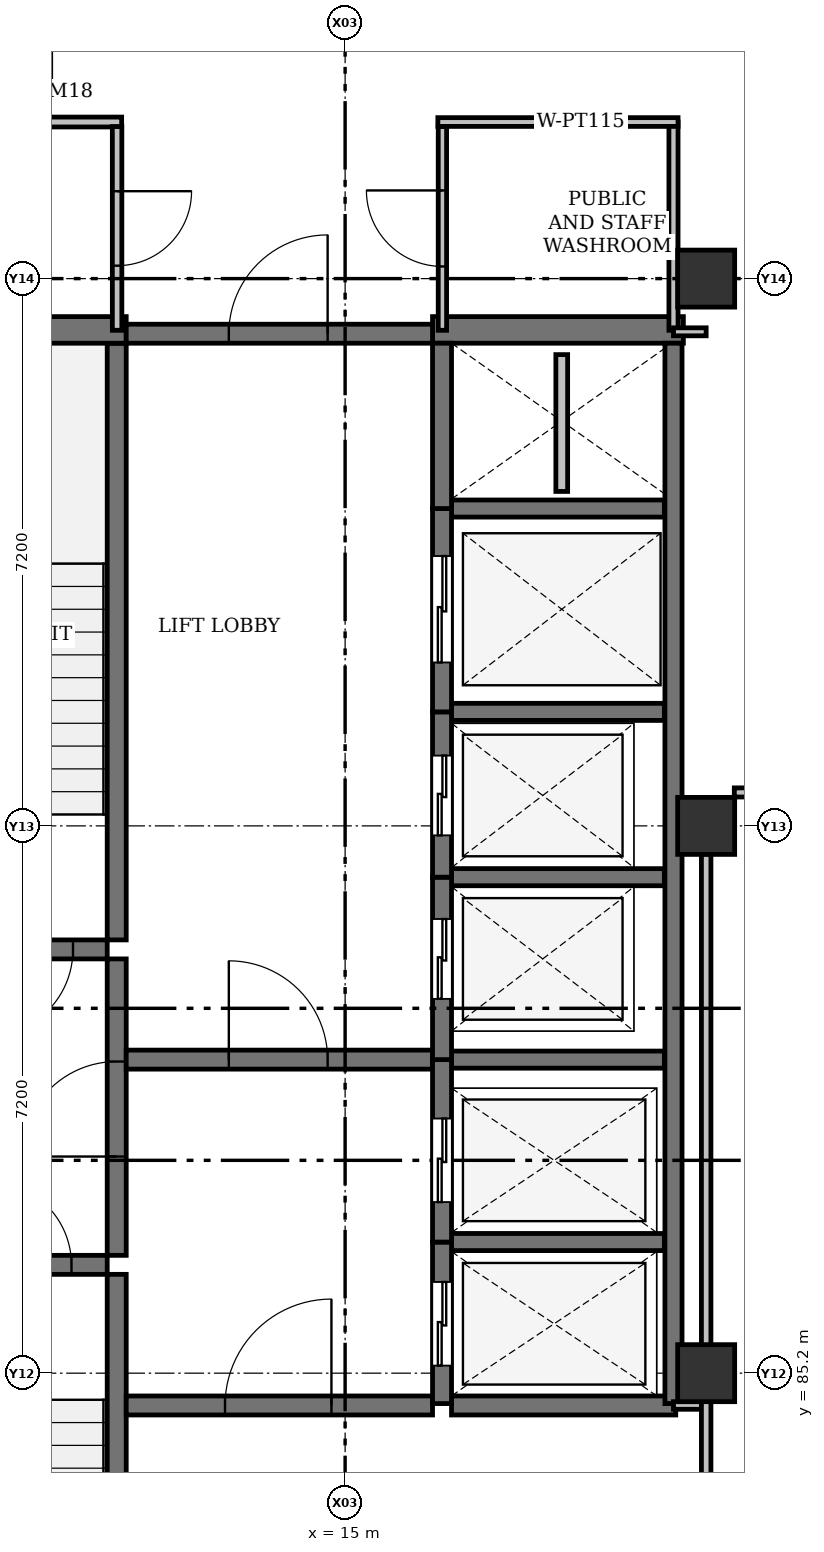
"""IFC4 building model, lengths in metres.
Left out: names, types, materials, properties, quantities, classifications, styles, units other than length and angle.
Written with IfcOpenShell. Run it as: python <this file> out.ifc"""

import sys

from ifc_helpers import new_model, si_unit, direction, frame, frame_2d, origin, origin_2d, place, context, subcontext, project, spatial, rectangle, extrude, element, fill, save


model = new_model("IFC4")
c1 = context("Model", 3, precision=1e-05, world=origin(), true_north=direction((0.0, 1.0)))
c2 = subcontext(c1, "Body", "Model", "MODEL_VIEW")
j1 = project(units=[si_unit("LENGTHUNIT", "METRE"), si_unit("PLANEANGLEUNIT", "RADIAN")], contexts=[c1])
p1 = place(None, origin())
s1 = spatial("IfcSite", under=j1, at=p1, CompositionType="ELEMENT")
p2 = place(p1, origin())
s2 = spatial("IfcBuilding", under=s1, at=p2, CompositionType="ELEMENT")
p3 = place(p2, frame((0.0, 0.0, -4.2)))
s3 = spatial("IfcBuildingStorey", under=s2, at=p3, CompositionType="ELEMENT", Elevation=-4.2)
for number, where, z_axis, x_axis in (
    (1, (19.75, 85.2, 0.0), (0.0, 0.0, 1.0), (1.0, 0.0, 0.0)),
    (2, (19.75, 92.4, 0.0), (0.0, 0.0, 1.0), (1.0, 0.0, 0.0)),
    (3, (19.75, 99.6, 0.0), (0.0, 0.0, 1.0), (1.0, 0.0, 0.0)),
):
    element("IfcColumn", number, at=place(p3, frame(where, z_axis=z_axis, x_axis=x_axis)), inside=s3, PredefinedType="COLUMN", context=c2, shape_type="SweptSolid", body=[
        extrude(rectangle(XDim=0.75, YDim=0.75, at=origin_2d()), origin(), (0.0, 0.0, 1.0), 4.2),
    ])
for number, where, z_axis, x_axis in (
    (4, (11.995, 78.65, 0.0), (0.0, 0.0, 1.0), (0.0, 1.0, 0.0)),
    (5, (11.995, 90.9, 0.0), (0.0, 0.0, 1.0), (0.0, 1.0, 0.0)),
):
    element("IfcWall", number, at=place(p3, frame(where, z_axis=z_axis, x_axis=x_axis)), inside=s3, PredefinedType="SHEAR", context=c2, shape_type="SweptSolid", body=[
        extrude(rectangle(XDim=7.85, YDim=0.25, at=frame_2d((3.925, 0.0))), origin(), (0.0, 0.0, 1.0), 4.2),
    ])
p4 = place(p3, frame((11.995, 86.75, 0.0), z_axis=(0.0, 0.0, 1.0), x_axis=(0.0, 1.0, 0.0)))
e6 = element("IfcWall", 6, at=p4, inside=s3, PredefinedType="SHEAR", context=c2, shape_type="SweptSolid", body=[
    extrude(rectangle(XDim=3.9, YDim=0.25, at=frame_2d((1.95, 0.0))), origin(), (0.0, 0.0, 1.0), 4.2),
])
p5 = place(p4, frame((1.3, 0.0, 0.0)))
e7 = element("IfcOpeningElement", 7, at=p5, cuts=e6, PredefinedType="OPENING", context=c2, shape_type="SweptSolid", body=[
    extrude(rectangle(XDim=1.25, YDim=2.2, at=frame_2d((0.625, 1.1))), frame((0.0, 0.125, 0.0), z_axis=(0.0, -1.0, 0.0), x_axis=(1.0, 0.0, 0.0)), (0.0, 0.0, 1.0), 0.25),
])
p6 = place(p3, frame((8.35, 98.925, 0.0), z_axis=(0.0, 0.0, 1.0), x_axis=(1.0, 0.0, 0.0)))
e8 = element("IfcWall", 8, at=p6, inside=s3, PredefinedType="SHEAR", context=c2, shape_type="SweptSolid", body=[
    extrude(rectangle(XDim=3.77, YDim=0.35, at=frame_2d((1.885, 0.0))), origin(), (0.0, 0.0, 1.0), 4.2),
])
p7 = place(p3, frame((16.15, 98.925, 0.0), z_axis=(0.0, 0.0, 1.0), x_axis=(1.0, 0.0, 0.0)))
e9 = element("IfcWall", 9, at=p7, inside=s3, PredefinedType="SHEAR", context=c2, shape_type="SweptSolid", body=[
    extrude(rectangle(XDim=3.3, YDim=0.35, at=frame_2d((1.65, 0.0))), origin(), (0.0, 0.0, 1.0), 4.2),
])
p8 = place(p3, frame((12.12, 98.875, 0.0), z_axis=(0.0, 0.0, 1.0), x_axis=(1.0, 0.0, 0.0)))
e10 = element("IfcWall", 10, at=p8, inside=s3, PredefinedType="SHEAR", context=c2, shape_type="SweptSolid", body=[
    extrude(rectangle(XDim=4.03, YDim=0.25, at=frame_2d((2.015, 0.0))), origin(), (0.0, 0.0, 1.0), 4.2),
])
p9 = place(p8, frame((1.35, 0.0, 0.0)))
e11 = element("IfcOpeningElement", 11, at=p9, cuts=e10, PredefinedType="OPENING", context=c2, shape_type="SweptSolid", body=[
    extrude(rectangle(XDim=1.3, YDim=2.2, at=frame_2d((0.65, 1.1))), frame((0.0, 0.125, 0.0), z_axis=(0.0, -1.0, 0.0), x_axis=(1.0, 0.0, 0.0)), (0.0, 0.0, 1.0), 0.25),
])
p10 = place(p3, frame((8.55, 86.625, 0.0), z_axis=(0.0, 0.0, 1.0), x_axis=(1.0, 0.0, 0.0)))
e12 = element("IfcWall", 12, at=p10, inside=s3, PredefinedType="SHEAR", context=c2, shape_type="SweptSolid", body=[
    extrude(rectangle(XDim=3.32, YDim=0.25, at=frame_2d((1.66, 0.0))), origin(), (0.0, 0.0, 1.0), 4.2),
])
p11 = place(p10, frame((1.75, 0.0, 0.0)))
e13 = element("IfcOpeningElement", 13, at=p11, cuts=e12, PredefinedType="OPENING", context=c2, shape_type="SweptSolid", body=[
    extrude(rectangle(XDim=1.1, YDim=2.15, at=frame_2d((0.55, 1.075))), frame((0.0, 0.125, 0.0), z_axis=(0.0, -1.0, 0.0), x_axis=(1.0, 0.0, 0.0)), (0.0, 0.0, 1.0), 0.25),
])
p12 = place(p3, frame((11.87, 90.775, 0.0), z_axis=(0.0, 0.0, 1.0), x_axis=(-1.0, 0.0, 0.0)))
e14 = element("IfcWall", 14, at=p12, inside=s3, PredefinedType="SHEAR", context=c2, shape_type="SweptSolid", body=[
    extrude(rectangle(XDim=3.32, YDim=0.25, at=frame_2d((1.66, 0.0))), origin(), (0.0, 0.0, 1.0), 4.2),
])
p13 = place(p12, frame((0.45, 0.0, 0.0)))
e15 = element("IfcOpeningElement", 15, at=p13, cuts=e14, PredefinedType="OPENING", context=c2, shape_type="SweptSolid", body=[
    extrude(rectangle(XDim=1.15, YDim=2.15, at=frame_2d((0.575, 1.075))), frame((0.0, 0.125, 0.0), z_axis=(0.0, -1.0, 0.0), x_axis=(1.0, 0.0, 0.0)), (0.0, 0.0, 1.0), 0.25),
])
p14 = place(p3, frame((12.12, 89.325, 0.0), z_axis=(0.0, 0.0, 1.0), x_axis=(1.0, 0.0, 0.0)))
e16 = element("IfcWall", 16, at=p14, inside=s3, PredefinedType="SHEAR", context=c2, shape_type="SweptSolid", body=[
    extrude(rectangle(XDim=4.03, YDim=0.25, at=frame_2d((2.015, 0.0))), origin(), (0.0, 0.0, 1.0), 4.2),
])
p15 = place(p14, frame((1.35, 0.0, 0.0)))
e17 = element("IfcOpeningElement", 17, at=p15, cuts=e16, PredefinedType="OPENING", context=c2, shape_type="SweptSolid", body=[
    extrude(rectangle(XDim=1.3, YDim=2.2, at=frame_2d((0.65, 1.1))), frame((0.0, 0.125, 0.0), z_axis=(0.0, -1.0, 0.0), x_axis=(1.0, 0.0, 0.0)), (0.0, 0.0, 1.0), 0.25),
])
p16 = place(p3, frame((12.12, 84.775, 0.0), z_axis=(0.0, 0.0, 1.0), x_axis=(1.0, 0.0, 0.0)))
e18 = element("IfcWall", 18, at=p16, inside=s3, PredefinedType="SHEAR", context=c2, shape_type="SweptSolid", body=[
    extrude(rectangle(XDim=4.03, YDim=0.25, at=frame_2d((2.015, 0.0))), origin(), (0.0, 0.0, 1.0), 4.2),
])
p17 = place(p16, frame((1.3, 0.0, 0.0)))
e19 = element("IfcOpeningElement", 19, at=p17, cuts=e18, PredefinedType="OPENING", context=c2, shape_type="SweptSolid", body=[
    extrude(rectangle(XDim=1.4, YDim=2.25, at=frame_2d((0.7, 1.125))), frame((0.0, 0.125, 0.0), z_axis=(0.0, -1.0, 0.0), x_axis=(1.0, 0.0, 0.0)), (0.0, 0.0, 1.0), 0.25),
])
p18 = place(p3, frame((16.4, 84.775, 0.0), z_axis=(0.0, 0.0, 1.0), x_axis=(1.0, 0.0, 0.0)))
e20 = element("IfcWall", 20, at=p18, inside=s3, PredefinedType="SHEAR", context=c2, shape_type="SweptSolid", body=[
    extrude(rectangle(XDim=2.95, YDim=0.25, at=frame_2d((1.475, 0.0))), origin(), (0.0, 0.0, 1.0), 4.2),
])
p19 = place(p3, frame((19.32, 84.8, 0.0), z_axis=(0.0, 0.0, 1.0), x_axis=(0.0, 1.0, 0.0)))
e21 = element("IfcWall", 21, at=p19, inside=s3, PredefinedType="SHEAR", context=c2, shape_type="SweptSolid", body=[
    extrude(rectangle(XDim=13.95, YDim=0.225, at=frame_2d((6.975, 0.0))), origin(), (0.0, 0.0, 1.0), 4.2),
])
for number, where, z_axis, x_axis in (
    (22, (16.4, 86.925, 0.0), (0.0, 0.0, 1.0), (1.0, 0.0, 0.0)),
    (23, (16.4, 89.325, 0.0), (0.0, 0.0, 1.0), (1.0, 0.0, 0.0)),
    (24, (16.4, 91.725, 0.0), (0.0, 0.0, 1.0), (1.0, 0.0, 0.0)),
    (25, (16.4, 93.9, 0.0), (0.0, 0.0, 1.0), (1.0, 0.0, 0.0)),
    (26, (16.4, 96.575, 0.0), (0.0, 0.0, 1.0), (1.0, 0.0, 0.0)),
):
    element("IfcWall", number, at=place(p3, frame(where, z_axis=z_axis, x_axis=x_axis)), inside=s3, PredefinedType="SHEAR", context=c2, shape_type="SweptSolid", body=[
        extrude(rectangle(XDim=2.8, YDim=0.225, at=frame_2d((1.4, 0.0))), origin(), (0.0, 0.0, 1.0), 4.2),
    ])
p20 = place(p3, frame((16.275, 84.8, 0.0), z_axis=(0.0, 0.0, 1.0), x_axis=(0.0, 1.0, 0.0)))
e27 = element("IfcWall", 27, at=p20, inside=s3, PredefinedType="SHEAR", context=c2, shape_type="SweptSolid", body=[
    extrude(rectangle(XDim=2.125, YDim=0.25, at=frame_2d((1.062, 0.0))), origin(), (0.0, 0.0, 1.0), 4.2),
])
p21 = place(p20, frame((0.5, 0.0, 0.0)))
e28 = element("IfcOpeningElement", 28, at=p21, cuts=e27, PredefinedType="OPENING", context=c2, shape_type="SweptSolid", body=[
    extrude(rectangle(XDim=1.1, YDim=2.15, at=frame_2d((0.55, 1.075))), frame((0.0, 0.125, 0.0), z_axis=(0.0, -1.0, 0.0), x_axis=(1.0, 0.0, 0.0)), (0.0, 0.0, 1.0), 0.25),
])
p22 = place(p3, frame((16.275, 86.925, 0.0), z_axis=(0.0, 0.0, 1.0), x_axis=(0.0, 1.0, 0.0)))
e29 = element("IfcWall", 29, at=p22, inside=s3, PredefinedType="SHEAR", context=c2, shape_type="SweptSolid", body=[
    extrude(rectangle(XDim=2.4, YDim=0.25, at=frame_2d((1.2, 0.0))), origin(), (0.0, 0.0, 1.0), 4.2),
])
p23 = place(p22, frame((0.525, 0.0, 0.0)))
e30 = element("IfcOpeningElement", 30, at=p23, cuts=e29, PredefinedType="OPENING", context=c2, shape_type="SweptSolid", body=[
    extrude(rectangle(XDim=1.1, YDim=2.15, at=frame_2d((0.55, 1.075))), frame((0.0, 0.125, 0.0), z_axis=(0.0, -1.0, 0.0), x_axis=(1.0, 0.0, 0.0)), (0.0, 0.0, 1.0), 0.25),
])
p24 = place(p3, frame((16.275, 89.325, 0.0), z_axis=(0.0, 0.0, 1.0), x_axis=(0.0, 1.0, 0.0)))
e31 = element("IfcWall", 31, at=p24, inside=s3, PredefinedType="SHEAR", context=c2, shape_type="SweptSolid", body=[
    extrude(rectangle(XDim=2.4, YDim=0.25, at=frame_2d((1.2, 0.0))), origin(), (0.0, 0.0, 1.0), 4.2),
])
p25 = place(p24, frame((0.8, 0.0, 0.0)))
e32 = element("IfcOpeningElement", 32, at=p25, cuts=e31, PredefinedType="OPENING", context=c2, shape_type="SweptSolid", body=[
    extrude(rectangle(XDim=1.05, YDim=2.15, at=frame_2d((0.525, 1.075))), frame((0.0, 0.125, 0.0), z_axis=(0.0, -1.0, 0.0), x_axis=(1.0, 0.0, 0.0)), (0.0, 0.0, 1.0), 0.25),
])
p26 = place(p3, frame((16.275, 91.725, 0.0), z_axis=(0.0, 0.0, 1.0), x_axis=(0.0, 1.0, 0.0)))
e33 = element("IfcWall", 33, at=p26, inside=s3, PredefinedType="SHEAR", context=c2, shape_type="SweptSolid", body=[
    extrude(rectangle(XDim=2.175, YDim=0.25, at=frame_2d((1.087, 0.0))), origin(), (0.0, 0.0, 1.0), 4.2),
])
p27 = place(p26, frame((0.55, 0.0, 0.0)))
e34 = element("IfcOpeningElement", 34, at=p27, cuts=e33, PredefinedType="OPENING", context=c2, shape_type="SweptSolid", body=[
    extrude(rectangle(XDim=1.05, YDim=2.15, at=frame_2d((0.525, 1.075))), frame((0.0, 0.125, 0.0), z_axis=(0.0, -1.0, 0.0), x_axis=(1.0, 0.0, 0.0)), (0.0, 0.0, 1.0), 0.25),
])
p28 = place(p3, frame((16.275, 93.9, 0.0), z_axis=(0.0, 0.0, 1.0), x_axis=(0.0, 1.0, 0.0)))
e35 = element("IfcWall", 35, at=p28, inside=s3, PredefinedType="SHEAR", context=c2, shape_type="SweptSolid", body=[
    extrude(rectangle(XDim=2.675, YDim=0.25, at=frame_2d((1.337, 0.0))), origin(), (0.0, 0.0, 1.0), 4.2),
])
p29 = place(p28, frame((0.65, 0.0, 0.0)))
e36 = element("IfcOpeningElement", 36, at=p29, cuts=e35, PredefinedType="OPENING", context=c2, shape_type="SweptSolid", body=[
    extrude(rectangle(XDim=1.4, YDim=2.25, at=frame_2d((0.7, 1.125))), frame((0.0, 0.125, 0.0), z_axis=(0.0, -1.0, 0.0), x_axis=(1.0, 0.0, 0.0)), (0.0, 0.0, 1.0), 0.25),
])
p30 = place(p3, frame((16.275, 96.575, 0.0), z_axis=(0.0, 0.0, 1.0), x_axis=(0.0, 1.0, 0.0)))
e37 = element("IfcWall", 37, at=p30, inside=s3, PredefinedType="SHEAR", context=c2, shape_type="SweptSolid", body=[
    extrude(rectangle(XDim=2.175, YDim=0.25, at=frame_2d((1.087, 0.0))), origin(), (0.0, 0.0, 1.0), 4.2),
])
p31 = place(p3, frame((17.85, 96.8, 0.0), z_axis=(0.0, 0.0, 1.0), x_axis=(0.0, 1.0, 0.0)))
e38 = element("IfcWall", 38, at=p31, inside=s3, PredefinedType="PLUMBINGWALL", context=c2, shape_type="SweptSolid", body=[
    extrude(rectangle(XDim=1.8, YDim=0.155, at=frame_2d((0.9, 0.0))), origin(), (0.0, 0.0, 1.0), 4.2),
])
p32 = place(p3, frame((8.36, 101.66, 0.0), z_axis=(0.0, 0.0, 1.0), x_axis=(1.0, 0.0, 0.0)))
e39 = element("IfcWall", 39, at=p32, inside=s3, PredefinedType="PARTITIONING", context=c2, shape_type="SweptSolid", body=[
    extrude(rectangle(XDim=3.7, YDim=0.13, at=frame_2d((1.85, 0.0))), origin(), (0.0, 0.0, 1.0), 3.95),
])
p33 = place(p3, frame((12.0, 101.6, 0.0), z_axis=(0.0, 0.0, 1.0), x_axis=(0.0, -1.0, 0.0)))
e40 = element("IfcWall", 40, at=p33, inside=s3, PredefinedType="PARTITIONING", context=c2, shape_type="SweptSolid", body=[
    extrude(rectangle(XDim=2.68, YDim=0.125, at=frame_2d((1.34, 0.0))), origin(), (0.0, 0.0, 1.0), 3.401),
])
p34 = place(p33, frame((0.85, 0.0, 0.0)))
e41 = element("IfcOpeningElement", 41, at=p34, cuts=e40, PredefinedType="OPENING", context=c2, shape_type="SweptSolid", body=[
    extrude(rectangle(XDim=0.98, YDim=2.1, at=frame_2d((0.49, 1.05))), frame((0.0, 0.062, 0.0), z_axis=(0.0, -1.0, 0.0), x_axis=(1.0, 0.0, 0.0)), (0.0, 0.0, 1.0), 0.125),
])
p35 = place(p3, frame((19.32, 98.92, 0.0), z_axis=(0.0, 0.0, 1.0), x_axis=(0.0, 1.0, 0.0)))
e42 = element("IfcWall", 42, at=p35, inside=s3, PredefinedType="PARTITIONING", context=c2, shape_type="SweptSolid", body=[
    extrude(rectangle(XDim=2.74, YDim=0.12, at=frame_2d((1.37, 0.0))), origin(), (0.0, 0.0, 1.0), 3.401),
])
p36 = place(p3, frame((19.38, 101.66, 0.0), z_axis=(0.0, 0.0, 1.0), x_axis=(-1.0, 0.0, 0.0)))
e43 = element("IfcWall", 43, at=p36, inside=s3, PredefinedType="PARTITIONING", context=c2, shape_type="SweptSolid", body=[
    extrude(rectangle(XDim=3.16, YDim=0.115, at=frame_2d((1.58, 0.0))), origin(), (0.0, 0.0, 1.0), 3.95),
])
p37 = place(p3, frame((16.28, 98.92, 0.0), z_axis=(0.0, 0.0, 1.0), x_axis=(0.0, 1.0, 0.0)))
e44 = element("IfcWall", 44, at=p37, inside=s3, PredefinedType="PARTITIONING", context=c2, shape_type="SweptSolid", body=[
    extrude(rectangle(XDim=2.68, YDim=0.11, at=frame_2d((1.34, 0.0))), origin(), (0.0, 0.0, 1.0), 3.401),
])
p38 = place(p37, frame((0.84, 0.0, 0.0)))
e45 = element("IfcOpeningElement", 45, at=p38, cuts=e44, PredefinedType="OPENING", context=c2, shape_type="SweptSolid", body=[
    extrude(rectangle(XDim=1.0, YDim=2.1, at=frame_2d((0.5, 1.05))), frame((0.0, 0.055, 0.0), z_axis=(0.0, -1.0, 0.0), x_axis=(1.0, 0.0, 0.0)), (0.0, 0.0, 1.0), 0.11),
])
p39 = place(p3, frame((19.75, 98.9, 0.0), z_axis=(0.0, 0.0, 1.0), x_axis=(-1.0, 0.0, 0.0)))
e46 = element("IfcWall", 46, at=p39, inside=s3, PredefinedType="PARTITIONING", context=c2, shape_type="SweptSolid", body=[
    extrude(rectangle(XDim=0.43, YDim=0.105, at=frame_2d((0.215, 0.0))), origin(), (0.0, 0.0, 1.0), 3.477),
])
p40 = place(p3, frame((19.32, 84.775, 0.0), z_axis=(0.0, 0.0, 1.0), x_axis=(1.0, 0.0, 0.0)))
e47 = element("IfcWall", 47, at=p40, inside=s3, PredefinedType="PARTITIONING", context=c2, shape_type="SweptSolid", body=[
    extrude(rectangle(XDim=0.43, YDim=0.1, at=frame_2d((0.215, 0.0))), origin(), (0.0, 0.0, 1.0), 3.477),
])
p41 = place(p3, frame((19.75, 92.03, 0.0), z_axis=(0.0, 0.0, 1.0), x_axis=(0.0, -1.0, 0.0)))
e48 = element("IfcWall", 48, at=p41, inside=s3, PredefinedType="PARTITIONING", context=c2, shape_type="SweptSolid", body=[
    extrude(rectangle(XDim=16.23, YDim=0.125, at=frame_2d((8.115, 0.0))), origin(), (0.0, 0.0, 1.0), 3.477),
])
p42 = place(p3, frame((20.12, 92.84, 0.0), z_axis=(0.0, 0.0, 1.0), x_axis=(1.0, 0.0, 0.0)))
e49 = element("IfcWall", 49, at=p42, inside=s3, PredefinedType="PARTITIONING", context=c2, shape_type="SweptSolid", body=[
    extrude(rectangle(XDim=12.28, YDim=0.12, at=frame_2d((6.14, 0.0))), origin(), (0.0, 0.0, 1.0), 3.217),
])
p43 = place(p5, origin())
e50 = element("IfcDoor", 50, at=p43, inside=s3, OperationType="SINGLE_SWING_LEFT", PredefinedType="DOOR", context=c2, shape_type="SweptSolid", body=[
    extrude(rectangle(XDim=1.25, YDim=2.2, at=frame_2d((0.625, 1.1))), frame((0.0, 0.025, 0.0), z_axis=(0.0, -1.0, 0.0), x_axis=(1.0, 0.0, 0.0)), (0.0, 0.0, 1.0), 0.05),
])
fill(e7, e50)
p44 = place(p9, origin())
e51 = element("IfcDoor", 51, at=p44, inside=s3, OperationType="SINGLE_SWING_RIGHT", PredefinedType="DOOR", context=c2, shape_type="SweptSolid", body=[
    extrude(rectangle(XDim=1.3, YDim=2.2, at=frame_2d((0.65, 1.1))), frame((0.0, 0.025, 0.0), z_axis=(0.0, -1.0, 0.0), x_axis=(1.0, 0.0, 0.0)), (0.0, 0.0, 1.0), 0.05),
])
fill(e11, e51)
p45 = place(p11, origin())
e52 = element("IfcDoor", 52, at=p45, inside=s3, OperationType="SINGLE_SWING_LEFT", PredefinedType="DOOR", context=c2, shape_type="SweptSolid", body=[
    extrude(rectangle(XDim=1.1, YDim=2.15, at=frame_2d((0.55, 1.075))), frame((0.0, 0.025, 0.0), z_axis=(0.0, -1.0, 0.0), x_axis=(1.0, 0.0, 0.0)), (0.0, 0.0, 1.0), 0.05),
])
fill(e13, e52)
p46 = place(p13, origin())
e53 = element("IfcDoor", 53, at=p46, inside=s3, OperationType="SINGLE_SWING_RIGHT", PredefinedType="DOOR", context=c2, shape_type="SweptSolid", body=[
    extrude(rectangle(XDim=1.15, YDim=2.15, at=frame_2d((0.575, 1.075))), frame((0.0, 0.025, 0.0), z_axis=(0.0, -1.0, 0.0), x_axis=(1.0, 0.0, 0.0)), (0.0, 0.0, 1.0), 0.05),
])
fill(e15, e53)
p47 = place(p15, origin())
e54 = element("IfcDoor", 54, at=p47, inside=s3, OperationType="SINGLE_SWING_LEFT", PredefinedType="DOOR", context=c2, shape_type="SweptSolid", body=[
    extrude(rectangle(XDim=1.3, YDim=2.2, at=frame_2d((0.65, 1.1))), frame((0.0, 0.025, 0.0), z_axis=(0.0, -1.0, 0.0), x_axis=(1.0, 0.0, 0.0)), (0.0, 0.0, 1.0), 0.05),
])
fill(e17, e54)
p48 = place(p17, origin())
e55 = element("IfcDoor", 55, at=p48, inside=s3, OperationType="SINGLE_SWING_RIGHT", PredefinedType="DOOR", context=c2, shape_type="SweptSolid", body=[
    extrude(rectangle(XDim=1.4, YDim=2.25, at=frame_2d((0.7, 1.125))), frame((0.0, 0.025, 0.0), z_axis=(0.0, -1.0, 0.0), x_axis=(1.0, 0.0, 0.0)), (0.0, 0.0, 1.0), 0.05),
])
fill(e19, e55)
p49 = place(p21, origin())
e56 = element("IfcDoor", 56, at=p49, inside=s3, OperationType="SLIDING_TO_LEFT", PredefinedType="DOOR", context=c2, shape_type="SweptSolid", body=[
    extrude(rectangle(XDim=1.1, YDim=2.15, at=frame_2d((0.55, 1.075))), frame((0.0, 0.025, 0.0), z_axis=(0.0, -1.0, 0.0), x_axis=(1.0, 0.0, 0.0)), (0.0, 0.0, 1.0), 0.05),
])
fill(e28, e56)
p50 = place(p23, origin())
e57 = element("IfcDoor", 57, at=p50, inside=s3, OperationType="SLIDING_TO_LEFT", PredefinedType="DOOR", context=c2, shape_type="SweptSolid", body=[
    extrude(rectangle(XDim=1.1, YDim=2.15, at=frame_2d((0.55, 1.075))), frame((0.0, 0.025, 0.0), z_axis=(0.0, -1.0, 0.0), x_axis=(1.0, 0.0, 0.0)), (0.0, 0.0, 1.0), 0.05),
])
fill(e30, e57)
p51 = place(p25, origin())
e58 = element("IfcDoor", 58, at=p51, inside=s3, OperationType="SLIDING_TO_LEFT", PredefinedType="DOOR", context=c2, shape_type="SweptSolid", body=[
    extrude(rectangle(XDim=1.05, YDim=2.15, at=frame_2d((0.525, 1.075))), frame((0.0, 0.025, 0.0), z_axis=(0.0, -1.0, 0.0), x_axis=(1.0, 0.0, 0.0)), (0.0, 0.0, 1.0), 0.05),
])
fill(e32, e58)
p52 = place(p27, origin())
e59 = element("IfcDoor", 59, at=p52, inside=s3, OperationType="SLIDING_TO_LEFT", PredefinedType="DOOR", context=c2, shape_type="SweptSolid", body=[
    extrude(rectangle(XDim=1.05, YDim=2.15, at=frame_2d((0.525, 1.075))), frame((0.0, 0.025, 0.0), z_axis=(0.0, -1.0, 0.0), x_axis=(1.0, 0.0, 0.0)), (0.0, 0.0, 1.0), 0.05),
])
fill(e34, e59)
p53 = place(p29, origin())
e60 = element("IfcDoor", 60, at=p53, inside=s3, OperationType="SLIDING_TO_LEFT", PredefinedType="DOOR", context=c2, shape_type="SweptSolid", body=[
    extrude(rectangle(XDim=1.4, YDim=2.25, at=frame_2d((0.7, 1.125))), frame((0.0, 0.025, 0.0), z_axis=(0.0, -1.0, 0.0), x_axis=(1.0, 0.0, 0.0)), (0.0, 0.0, 1.0), 0.05),
])
fill(e36, e60)
p54 = place(p34, origin())
e61 = element("IfcDoor", 61, at=p54, inside=s3, OperationType="SINGLE_SWING_LEFT", PredefinedType="DOOR", context=c2, shape_type="SweptSolid", body=[
    extrude(rectangle(XDim=0.98, YDim=2.1, at=frame_2d((0.49, 1.05))), frame((0.0, 0.025, 0.0), z_axis=(0.0, -1.0, 0.0), x_axis=(1.0, 0.0, 0.0)), (0.0, 0.0, 1.0), 0.05),
])
fill(e41, e61)
p55 = place(p38, origin())
e62 = element("IfcDoor", 62, at=p55, inside=s3, OperationType="SINGLE_SWING_RIGHT", PredefinedType="DOOR", context=c2, shape_type="SweptSolid", body=[
    extrude(rectangle(XDim=1.0, YDim=2.1, at=frame_2d((0.5, 1.05))), frame((0.0, 0.025, 0.0), z_axis=(0.0, -1.0, 0.0), x_axis=(1.0, 0.0, 0.0)), (0.0, 0.0, 1.0), 0.05),
])
fill(e45, e62)
save(model, sys.argv[1])
